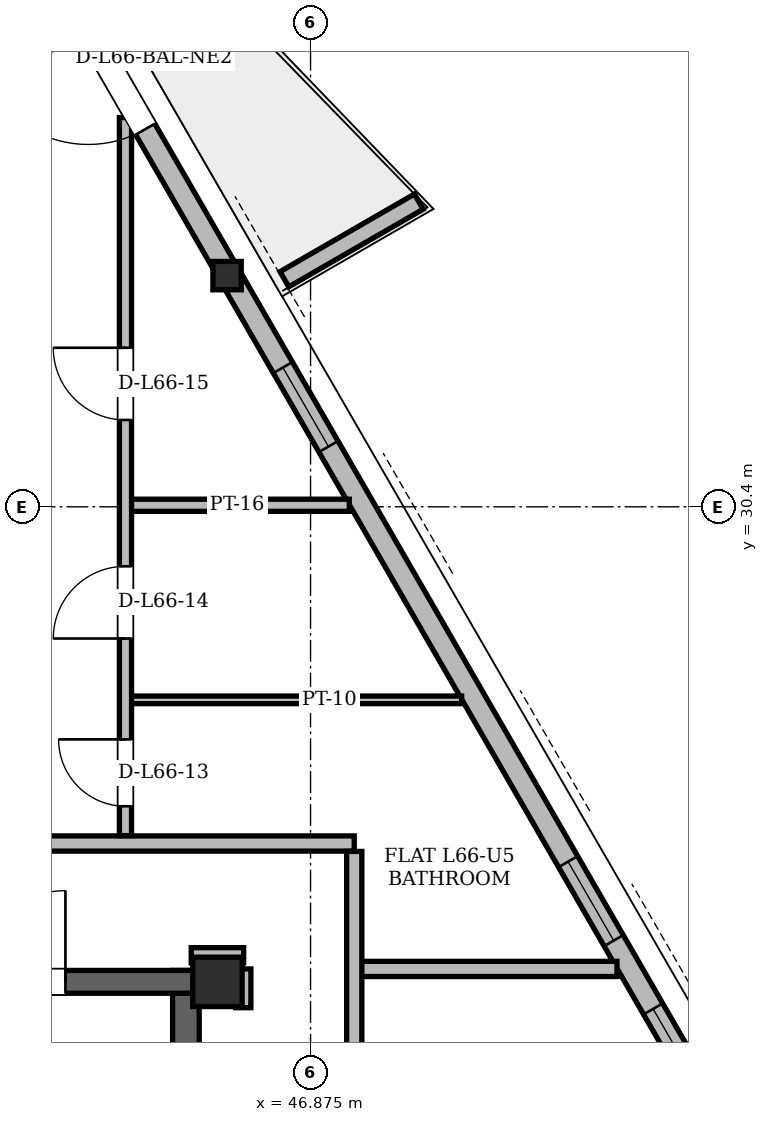
"""IFC4 building model, lengths in metres.
Left out: names, types, materials, properties, quantities, classifications, styles, units other than length and angle.
Written with IfcOpenShell. Run it as: python <this file> out.ifc"""

import sys

from ifc_helpers import new_model, si_unit, direction, frame, frame_2d, origin, origin_2d, place, context, subcontext, project, spatial, polyline, rectangle, hollow_rectangle, i_section, outline, extrude, element, fill, save


model = new_model("IFC4")
c1 = context("Model", 3, precision=1e-05, world=origin(), true_north=direction((0.0, 1.0)))
c2 = subcontext(c1, "Body", "Model", "MODEL_VIEW")
j1 = project(units=[si_unit("LENGTHUNIT", "METRE"), si_unit("PLANEANGLEUNIT", "RADIAN")], contexts=[c1])
p1 = place(None, origin())
s1 = spatial("IfcSite", under=j1, at=p1, CompositionType="ELEMENT")
p2 = place(p1, origin())
s2 = spatial("IfcBuilding", under=s1, at=p2, CompositionType="ELEMENT")
p3 = place(p2, frame((0.0, 0.0, 249.9)))
s3 = spatial("IfcBuildingStorey", under=s2, at=p3, CompositionType="ELEMENT", Elevation=249.9)
p4 = place(p3, frame((45.65, 24.15, 0.0), z_axis=(0.0, 0.0, 1.0), x_axis=(1.0, 0.0, 0.0)))
e1 = element("IfcColumn", 1, at=p4, inside=s3, PredefinedType="COLUMN", context=c2, shape_type="SweptSolid", body=[
    extrude(hollow_rectangle(XDim=0.65, YDim=0.65, WallThickness=0.05, at=origin_2d()), origin(), (0.0, 0.0, 1.0), 3.9),
])
p5 = place(p3, frame((45.806, 33.452, 0.005), z_axis=(-0.01505734327, -0.005709242657, 0.999870332074), x_axis=(0.354536784077, -0.935042067896, 0.0)))
e2 = element("IfcColumn", 2, at=p5, inside=s3, PredefinedType="COLUMN", context=c2, shape_type="SweptSolid", body=[
    extrude(i_section(OverallWidth=0.373, OverallDepth=0.373, WebThickness=0.016, FlangeThickness=0.026, at=origin_2d()), origin(), (0.0, 0.0, 1.0), 3.891),
])
p6 = place(p3, frame((45.235, 11.0, 0.0), z_axis=(0.0, 0.0, 1.0), x_axis=(0.0, 1.0, 0.0)))
e3 = element("IfcWall", 3, at=p6, inside=s3, PredefinedType="SHEAR", context=c2, shape_type="SweptSolid", body=[
    extrude(rectangle(XDim=13.3, YDim=0.35, at=frame_2d((6.65, 0.0))), origin(), (0.0, 0.0, 1.0), 3.68),
])
p7 = place(p3, frame((29.65, 24.15, 0.0), z_axis=(0.0, 0.0, 1.0), x_axis=(1.0, 0.0, 0.0)))
e4 = element("IfcWall", 4, at=p7, inside=s3, PredefinedType="SHEAR", context=c2, shape_type="SweptSolid", body=[
    extrude(rectangle(XDim=15.7, YDim=0.3, at=frame_2d((7.85, 0.0))), origin(), (0.0, 0.0, 1.0), 3.68),
])
p8 = place(p7, frame((1.7, 0.0, 0.0)))
e5 = element("IfcOpeningElement", 5, at=p8, cuts=e4, PredefinedType="OPENING", context=c2, shape_type="SweptSolid", body=[
    extrude(rectangle(XDim=1.2, YDim=2.2, at=frame_2d((0.6, 1.1))), frame((0.0, 0.15, 0.0), z_axis=(0.0, -1.0, 0.0), x_axis=(1.0, 0.0, 0.0)), (0.0, 0.0, 1.0), 0.3),
])
p9 = place(p7, frame((12.8, 0.0, 0.0)))
e6 = element("IfcOpeningElement", 6, at=p9, cuts=e4, PredefinedType="OPENING", context=c2, shape_type="SweptSolid", body=[
    extrude(rectangle(XDim=1.2, YDim=2.2, at=frame_2d((0.6, 1.1))), frame((0.0, 0.15, 0.0), z_axis=(0.0, -1.0, 0.0), x_axis=(1.0, 0.0, 0.0)), (0.0, 0.0, 1.0), 0.3),
])
p10 = place(p7, frame((6.55, 0.0, 0.0)))
e7 = element("IfcOpeningElement", 7, at=p10, cuts=e4, PredefinedType="OPENING", context=c2, shape_type="SweptSolid", body=[
    extrude(rectangle(XDim=0.9, YDim=2.05, at=frame_2d((0.45, 1.025))), frame((0.0, 0.15, 0.0), z_axis=(0.0, -1.0, 0.0), x_axis=(1.0, 0.0, 0.0)), (0.0, 0.0, 1.0), 0.3),
])
p11 = place(p7, frame((8.45, 0.0, 0.0)))
e8 = element("IfcOpeningElement", 8, at=p11, cuts=e4, PredefinedType="OPENING", context=c2, shape_type="SweptSolid", body=[
    extrude(rectangle(XDim=0.9, YDim=2.05, at=frame_2d((0.45, 1.025))), frame((0.0, 0.15, 0.0), z_axis=(0.0, -1.0, 0.0), x_axis=(1.0, 0.0, 0.0)), (0.0, 0.0, 1.0), 0.3),
])
p12 = place(p3, frame((58.774, 10.99, 0.0), z_axis=(0.0, 0.0, 1.0), x_axis=(-0.499994896969, 0.866028350001, 0.0)))
e9 = element("IfcWall", 9, at=p12, inside=s3, PredefinedType="SOLIDWALL", context=c2, shape_type="SweptSolid", body=[
    extrude(rectangle(XDim=37.053, YDim=0.29, at=frame_2d((18.526, 0.0))), origin(), (0.0, 0.0, 1.0), 3.058),
])
p13 = place(p12, frame((6.789, 0.0, 0.0)))
e10 = element("IfcOpeningElement", 10, at=p13, cuts=e9, PredefinedType="OPENING", context=c2, shape_type="SweptSolid", body=[
    extrude(rectangle(XDim=1.5, YDim=2.2, at=frame_2d((0.75, 1.1))), frame((0.0, 0.145, 0.0), z_axis=(0.0, -1.0, 0.0), x_axis=(1.0, 0.0, 0.0)), (0.0, 0.0, 1.0), 0.29),
])
p14 = place(p12, frame((28.148, 0.0, 0.0)))
e11 = element("IfcOpeningElement", 11, at=p14, cuts=e9, PredefinedType="OPENING", context=c2, shape_type="SweptSolid", body=[
    extrude(rectangle(XDim=1.5, YDim=2.2, at=frame_2d((0.75, 1.1))), frame((0.0, 0.145, 0.0), z_axis=(0.0, -1.0, 0.0), x_axis=(1.0, 0.0, 0.0)), (0.0, 0.0, 1.0), 0.29),
])
p15 = place(p12, frame((12.184, 0.0, 0.85)))
e12 = element("IfcOpeningElement", 12, at=p15, cuts=e9, PredefinedType="OPENING", context=c2, shape_type="SweptSolid", body=[
    extrude(rectangle(XDim=2.6, YDim=1.95, at=frame_2d((1.3, 0.975))), frame((0.0, 0.145, 0.0), z_axis=(0.0, -1.0, 0.0), x_axis=(1.0, 0.0, 0.0)), (0.0, 0.0, 1.0), 0.29),
])
p16 = place(p12, frame((1.066, 0.0, 0.85)))
e13 = element("IfcOpeningElement", 13, at=p16, cuts=e9, PredefinedType="OPENING", context=c2, shape_type="SweptSolid", body=[
    extrude(rectangle(XDim=2.4, YDim=1.9, at=frame_2d((1.2, 0.95))), frame((0.0, 0.145, 0.0), z_axis=(0.0, -1.0, 0.0), x_axis=(1.0, 0.0, 0.0)), (0.0, 0.0, 1.0), 0.29),
])
p17 = place(p12, frame((33.328, 0.0, 0.85)))
e14 = element("IfcOpeningElement", 14, at=p17, cuts=e9, PredefinedType="OPENING", context=c2, shape_type="SweptSolid", body=[
    extrude(rectangle(XDim=1.2, YDim=1.48, at=frame_2d((0.6, 0.74))), frame((0.0, 0.145, 0.0), z_axis=(0.0, -1.0, 0.0), x_axis=(1.0, 0.0, 0.0)), (0.0, 0.0, 1.0), 0.29),
])
p18 = place(p12, frame((15.822, 0.0, 0.85)))
e15 = element("IfcOpeningElement", 15, at=p18, cuts=e9, PredefinedType="OPENING", context=c2, shape_type="SweptSolid", body=[
    extrude(rectangle(XDim=1.2, YDim=1.48, at=frame_2d((0.6, 0.74))), frame((0.0, 0.145, 0.0), z_axis=(0.0, -1.0, 0.0), x_axis=(1.0, 0.0, 0.0)), (0.0, 0.0, 1.0), 0.29),
])
p19 = place(p12, frame((23.327, 0.0, 0.85)))
e16 = element("IfcOpeningElement", 16, at=p19, cuts=e9, PredefinedType="OPENING", context=c2, shape_type="SweptSolid", body=[
    extrude(rectangle(XDim=1.2, YDim=1.48, at=frame_2d((0.6, 0.74))), frame((0.0, 0.145, 0.0), z_axis=(0.0, -1.0, 0.0), x_axis=(1.0, 0.0, 0.0)), (0.0, 0.0, 1.0), 0.29),
])
p20 = place(p3, frame((46.531, 33.393, 0.0), z_axis=(0.0, 0.0, 1.0), x_axis=(0.866042246008, 0.499970827278, 0.0)))
e17 = element("IfcWall", 17, at=p20, inside=s3, PredefinedType="PARAPET", context=c2, shape_type="SweptSolid", body=[
    extrude(outline(polyline([(0.0, 0.0), (2.042, 0.0), (2.042, 1.1), (0.0, 1.32), (0.0, 0.0)])), frame((0.0, 0.115, 0.0), z_axis=(0.0, -1.0, 0.0), x_axis=(1.0, 0.0, 0.0)), (0.0, 0.0, 1.0), 0.23),
])
p21 = place(p3, frame((47.45, 24.32, 0.0), z_axis=(0.0, 0.0, 1.0), x_axis=(1.0, 0.0, 0.0)))
e18 = element("IfcWall", 18, at=p21, inside=s3, PredefinedType="PARTITIONING", context=c2, shape_type="SweptSolid", body=[
    extrude(rectangle(XDim=3.457, YDim=0.2, at=frame_2d((1.728, 0.0))), origin(), (0.0, 0.0, 1.0), 3.68),
])
p22 = place(p3, frame((45.305, 24.5, 0.0), z_axis=(0.0, 0.0, 1.0), x_axis=(1.0, 0.0, 0.0)))
e19 = element("IfcWall", 19, at=p22, inside=s3, PredefinedType="PARTITIONING", context=c2, shape_type="SweptSolid", body=[
    extrude(rectangle(XDim=0.69, YDim=0.2, at=frame_2d((0.345, 0.0))), origin(), (0.0, 0.0, 1.0), 3.266),
])
p23 = place(p3, frame((25.6, 25.97, 0.0), z_axis=(0.0, 0.0, 1.0), x_axis=(1.0, 0.0, 0.0)))
e20 = element("IfcWall", 20, at=p23, inside=s3, PredefinedType="PARTITIONING", context=c2, shape_type="SweptSolid", body=[
    extrude(rectangle(XDim=21.85, YDim=0.2, at=frame_2d((10.925, 0.0))), origin(), (0.0, 0.0, 1.0), 3.266),
])
p24 = place(p23, frame((4.747, 0.0, 0.0)))
e21 = element("IfcOpeningElement", 21, at=p24, cuts=e20, PredefinedType="OPENING", context=c2, shape_type="SweptSolid", body=[
    extrude(rectangle(XDim=1.0, YDim=2.18, at=frame_2d((0.5, 1.09))), frame((0.0, 0.1, 0.0), z_axis=(0.0, -1.0, 0.0), x_axis=(1.0, 0.0, 0.0)), (0.0, 0.0, 1.0), 0.2),
])
p25 = place(p23, frame((14.143, 0.0, 0.0)))
e22 = element("IfcOpeningElement", 22, at=p25, cuts=e20, PredefinedType="OPENING", context=c2, shape_type="SweptSolid", body=[
    extrude(rectangle(XDim=1.0, YDim=2.18, at=frame_2d((0.5, 1.09))), frame((0.0, 0.1, 0.0), z_axis=(0.0, -1.0, 0.0), x_axis=(1.0, 0.0, 0.0)), (0.0, 0.0, 1.0), 0.2),
])
p26 = place(p3, frame((44.435, 27.86, 0.0), z_axis=(0.0, 0.0, 1.0), x_axis=(1.0, 0.0, 0.0)))
e23 = element("IfcWall", 23, at=p26, inside=s3, PredefinedType="PARTITIONING", context=c2, shape_type="SweptSolid", body=[
    extrude(rectangle(XDim=4.428, YDim=0.1, at=frame_2d((2.214, 0.0))), origin(), (0.0, 0.0, 1.0), 3.68),
])
p27 = place(p3, frame((44.435, 30.42, 0.0), z_axis=(0.0, 0.0, 1.0), x_axis=(1.0, 0.0, 0.0)))
e24 = element("IfcWall", 24, at=p27, inside=s3, PredefinedType="PARTITIONING", context=c2, shape_type="SweptSolid", body=[
    extrude(rectangle(XDim=2.95, YDim=0.16, at=frame_2d((1.475, 0.0))), origin(), (0.0, 0.0, 1.0), 3.68),
])
p28 = place(p3, frame((44.44, 26.074, 0.0), z_axis=(0.0, 0.0, 1.0), x_axis=(0.0, 1.0, 0.0)))
e25 = element("IfcWall", 25, at=p28, inside=s3, PredefinedType="PARTITIONING", context=c2, shape_type="SweptSolid", body=[
    extrude(rectangle(XDim=9.447, YDim=0.16, at=frame_2d((4.723, 0.0))), origin(), (0.0, 0.0, 1.0), 3.058),
])
p29 = place(p28, frame((0.386, 0.0, 0.0)))
e26 = element("IfcOpeningElement", 26, at=p29, cuts=e25, PredefinedType="OPENING", context=c2, shape_type="SweptSolid", body=[
    extrude(rectangle(XDim=0.88, YDim=2.08, at=frame_2d((0.44, 1.04))), frame((0.0, 0.08, 0.0), z_axis=(0.0, -1.0, 0.0), x_axis=(1.0, 0.0, 0.0)), (0.0, 0.0, 1.0), 0.16),
])
p30 = place(p28, frame((2.593, 0.0, 0.0)))
e27 = element("IfcOpeningElement", 27, at=p30, cuts=e25, PredefinedType="OPENING", context=c2, shape_type="SweptSolid", body=[
    extrude(rectangle(XDim=0.95, YDim=2.1, at=frame_2d((0.475, 1.05))), frame((0.0, 0.08, 0.0), z_axis=(0.0, -1.0, 0.0), x_axis=(1.0, 0.0, 0.0)), (0.0, 0.0, 1.0), 0.16),
])
p31 = place(p28, frame((5.468, 0.0, 0.0)))
e28 = element("IfcOpeningElement", 28, at=p31, cuts=e25, PredefinedType="OPENING", context=c2, shape_type="SweptSolid", body=[
    extrude(rectangle(XDim=0.95, YDim=2.1, at=frame_2d((0.475, 1.05))), frame((0.0, 0.08, 0.0), z_axis=(0.0, -1.0, 0.0), x_axis=(1.0, 0.0, 0.0)), (0.0, 0.0, 1.0), 0.16),
])
p32 = place(p3, frame((45.99, 23.81, 0.0), z_axis=(0.0, 0.0, 1.0), x_axis=(0.0, 1.0, 0.0)))
e29 = element("IfcWall", 29, at=p32, inside=s3, PredefinedType="PARTITIONING", context=c2, shape_type="SweptSolid", body=[
    extrude(rectangle(XDim=0.51, YDim=0.2, at=frame_2d((0.255, 0.0))), origin(), (0.0, 0.0, 1.0), 3.68),
])
p33 = place(p3, frame((47.45, 9.404, 0.0), z_axis=(0.0, 0.0, 1.0), x_axis=(0.0, 1.0, 0.0)))
e30 = element("IfcWall", 30, at=p33, inside=s3, PredefinedType="PARTITIONING", context=c2, shape_type="SweptSolid", body=[
    extrude(rectangle(XDim=16.462, YDim=0.2, at=frame_2d((8.231, 0.0))), origin(), (0.0, 0.0, 1.0), 3.266),
])
p34 = place(p33, frame((9.32, 0.0, 0.0)))
e31 = element("IfcOpeningElement", 31, at=p34, cuts=e30, PredefinedType="OPENING", context=c2, shape_type="SweptSolid", body=[
    extrude(rectangle(XDim=1.0, YDim=2.18, at=frame_2d((0.5, 1.09))), frame((0.0, 0.1, 0.0), z_axis=(0.0, -1.0, 0.0), x_axis=(1.0, 0.0, 0.0)), (0.0, 0.0, 1.0), 0.2),
])
p35 = place(p14, origin())
e32 = element("IfcDoor", 32, at=p35, inside=s3, OperationType="SINGLE_SWING_RIGHT", PredefinedType="DOOR", context=c2, shape_type="SweptSolid", body=[
    extrude(rectangle(XDim=1.5, YDim=2.2, at=frame_2d((0.75, 1.1))), frame((0.0, 0.025, 0.0), z_axis=(0.0, -1.0, 0.0), x_axis=(1.0, 0.0, 0.0)), (0.0, 0.0, 1.0), 0.05),
])
fill(e11, e32)
p36 = place(p15, origin())
e33 = element("IfcWindow", 33, at=p36, inside=s3, PartitioningType="SINGLE_PANEL", PredefinedType="WINDOW", context=c2, shape_type="SweptSolid", body=[
    extrude(rectangle(XDim=2.6, YDim=1.95, at=frame_2d((1.3, 0.975))), frame((0.0, 0.03, 0.0), z_axis=(0.0, -1.0, 0.0), x_axis=(1.0, 0.0, 0.0)), (0.0, 0.0, 1.0), 0.06),
])
fill(e12, e33)
p37 = place(p18, origin())
e34 = element("IfcWindow", 34, at=p37, inside=s3, PartitioningType="SINGLE_PANEL", PredefinedType="WINDOW", context=c2, shape_type="SweptSolid", body=[
    extrude(rectangle(XDim=1.2, YDim=1.48, at=frame_2d((0.6, 0.74))), frame((0.0, 0.03, 0.0), z_axis=(0.0, -1.0, 0.0), x_axis=(1.0, 0.0, 0.0)), (0.0, 0.0, 1.0), 0.06),
])
fill(e15, e34)
p38 = place(p19, origin())
e35 = element("IfcWindow", 35, at=p38, inside=s3, PartitioningType="SINGLE_PANEL", PredefinedType="WINDOW", context=c2, shape_type="SweptSolid", body=[
    extrude(rectangle(XDim=1.2, YDim=1.48, at=frame_2d((0.6, 0.74))), frame((0.0, 0.03, 0.0), z_axis=(0.0, -1.0, 0.0), x_axis=(1.0, 0.0, 0.0)), (0.0, 0.0, 1.0), 0.06),
])
fill(e16, e35)
p39 = place(p9, origin())
e36 = element("IfcDoor", 36, at=p39, inside=s3, OperationType="SINGLE_SWING_RIGHT", PredefinedType="DOOR", context=c2, shape_type="SweptSolid", body=[
    extrude(rectangle(XDim=1.2, YDim=2.2, at=frame_2d((0.6, 1.1))), frame((0.0, 0.025, 0.0), z_axis=(0.0, -1.0, 0.0), x_axis=(1.0, 0.0, 0.0)), (0.0, 0.0, 1.0), 0.05),
])
fill(e6, e36)
p40 = place(p29, origin())
e37 = element("IfcDoor", 37, at=p40, inside=s3, OperationType="SINGLE_SWING_RIGHT", PredefinedType="DOOR", context=c2, shape_type="SweptSolid", body=[
    extrude(rectangle(XDim=0.88, YDim=2.08, at=frame_2d((0.44, 1.04))), frame((0.0, 0.025, 0.0), z_axis=(0.0, -1.0, 0.0), x_axis=(1.0, 0.0, 0.0)), (0.0, 0.0, 1.0), 0.05),
])
fill(e26, e37)
p41 = place(p30, origin())
e38 = element("IfcDoor", 38, at=p41, inside=s3, OperationType="SINGLE_SWING_LEFT", PredefinedType="DOOR", context=c2, shape_type="SweptSolid", body=[
    extrude(rectangle(XDim=0.95, YDim=2.1, at=frame_2d((0.475, 1.05))), frame((0.0, 0.025, 0.0), z_axis=(0.0, -1.0, 0.0), x_axis=(1.0, 0.0, 0.0)), (0.0, 0.0, 1.0), 0.05),
])
fill(e27, e38)
p42 = place(p31, origin())
e39 = element("IfcDoor", 39, at=p42, inside=s3, OperationType="SINGLE_SWING_RIGHT", PredefinedType="DOOR", context=c2, shape_type="SweptSolid", body=[
    extrude(rectangle(XDim=0.95, YDim=2.1, at=frame_2d((0.475, 1.05))), frame((0.0, 0.025, 0.0), z_axis=(0.0, -1.0, 0.0), x_axis=(1.0, 0.0, 0.0)), (0.0, 0.0, 1.0), 0.05),
])
fill(e28, e39)
save(model, sys.argv[1])
